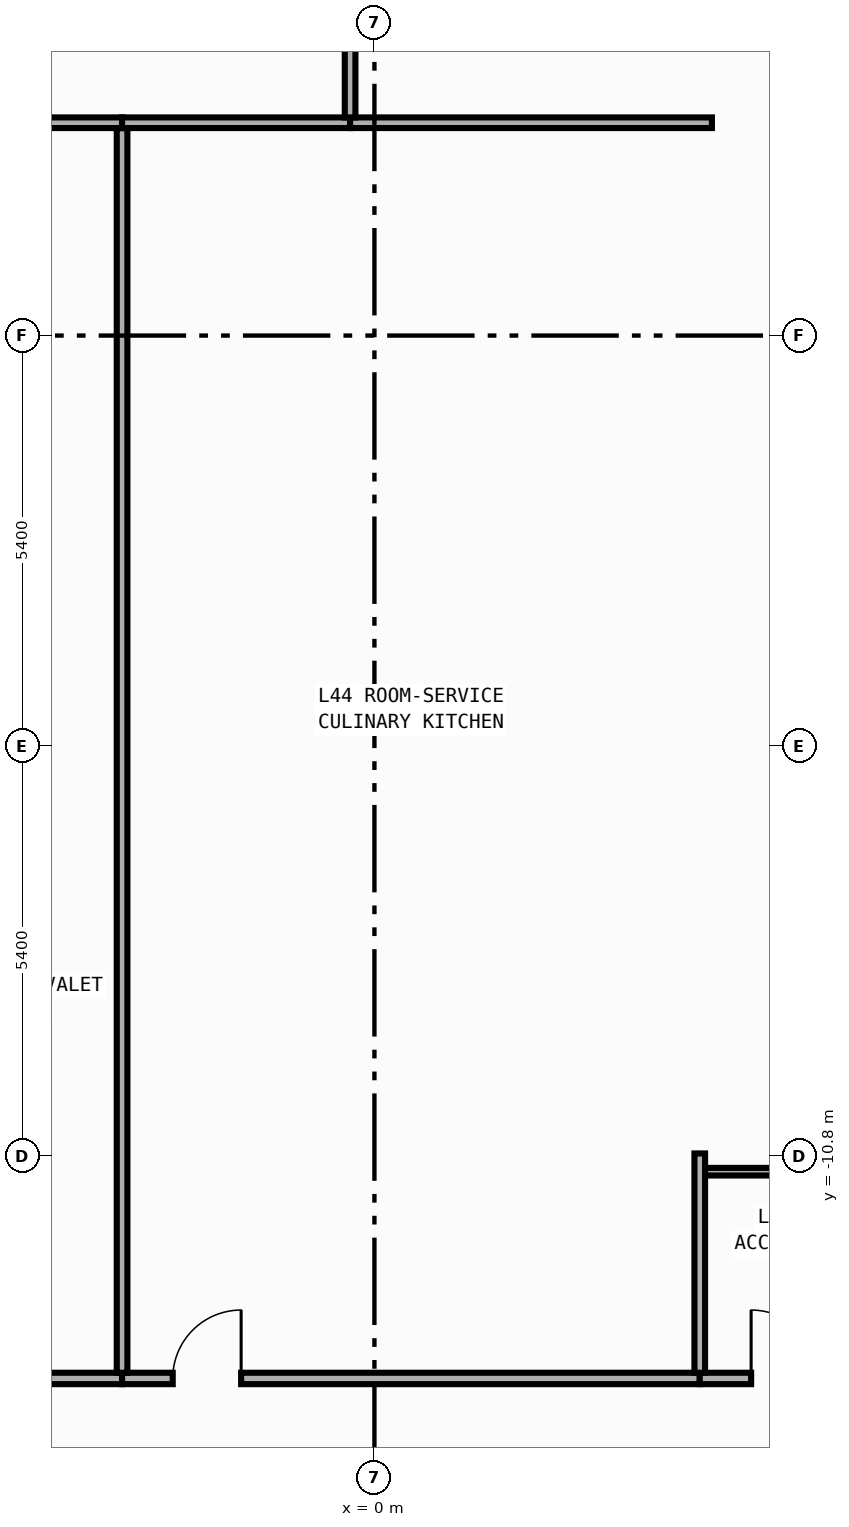
"""IFC4 building model, lengths in metres.
Left out: names, types, materials, properties, quantities, classifications, styles, units other than length and angle.
Written with IfcOpenShell. Run it as: python <this file> out.ifc"""

import sys

from ifc_helpers import new_model, si_unit, direction, frame, frame_2d, origin, place, context, subcontext, project, spatial, rectangle, extrude, element, fill, save


model = new_model("IFC4")
c1 = context("Model", 3, precision=1e-05, world=origin(), true_north=direction((0.0, 1.0)))
c2 = subcontext(c1, "Body", "Model", "MODEL_VIEW")
j1 = project(units=[si_unit("LENGTHUNIT", "METRE"), si_unit("PLANEANGLEUNIT", "RADIAN")], contexts=[c1])
p1 = place(None, origin())
s1 = spatial("IfcSite", under=j1, at=p1, CompositionType="ELEMENT")
p2 = place(p1, origin())
s2 = spatial("IfcBuilding", under=s1, at=p2, CompositionType="ELEMENT")
p3 = place(p2, frame((0.0, 0.0, 191.6)))
s3 = spatial("IfcBuildingStorey", under=s2, at=p3, CompositionType="ELEMENT", Elevation=191.6)
p4 = place(p3, frame((-6.12, -13.72, 0.0), z_axis=(0.0, 0.0, 1.0), x_axis=(1.0, 0.0, 0.0)))
e1 = element("IfcWall", 1, at=p4, inside=s3, PredefinedType="PARTITIONING", context=c2, shape_type="SweptSolid", body=[
    extrude(rectangle(XDim=2.8, YDim=0.15, at=frame_2d((1.4, 0.0))), origin(), (0.0, 0.0, 1.0), 3.54),
])
p5 = place(p4, frame((0.46, 0.0, 0.0)))
e2 = element("IfcOpeningElement", 2, at=p5, cuts=e1, PredefinedType="OPENING", context=c2, shape_type="SweptSolid", body=[
    extrude(rectangle(XDim=0.9, YDim=2.15, at=frame_2d((0.45, 1.075))), frame((0.0, 0.085, 0.0), z_axis=(0.0, -1.0, 0.0), x_axis=(1.0, 0.0, 0.0)), (0.0, 0.0, 1.0), 0.17),
])
p6 = place(p3, frame((-3.32, -13.72, 0.0), z_axis=(0.0, 0.0, 1.0), x_axis=(1.0, 0.0, 0.0)))
e3 = element("IfcWall", 3, at=p6, inside=s3, PredefinedType="PARTITIONING", context=c2, shape_type="SweptSolid", body=[
    extrude(rectangle(XDim=7.6, YDim=0.15, at=frame_2d((3.8, 0.0))), origin(), (0.0, 0.0, 1.0), 3.54),
])
p7 = place(p6, frame((0.667, 0.0, 0.0)))
e4 = element("IfcOpeningElement", 4, at=p7, cuts=e3, PredefinedType="OPENING", context=c2, shape_type="SweptSolid", body=[
    extrude(rectangle(XDim=0.9, YDim=2.15, at=frame_2d((0.45, 1.075))), frame((0.0, 0.085, 0.0), z_axis=(0.0, -1.0, 0.0), x_axis=(1.0, 0.0, 0.0)), (0.0, 0.0, 1.0), 0.17),
])
p8 = place(p3, frame((4.28, -13.72, 0.0), z_axis=(0.0, 0.0, 1.0), x_axis=(1.0, 0.0, 0.0)))
e5 = element("IfcWall", 5, at=p8, inside=s3, PredefinedType="PARTITIONING", context=c2, shape_type="SweptSolid", body=[
    extrude(rectangle(XDim=2.9, YDim=0.15, at=frame_2d((1.45, 0.0))), origin(), (0.0, 0.0, 1.0), 3.54),
])
p9 = place(p8, frame((0.676, 0.0, 0.0)))
e6 = element("IfcOpeningElement", 6, at=p9, cuts=e5, PredefinedType="OPENING", context=c2, shape_type="SweptSolid", body=[
    extrude(rectangle(XDim=0.9, YDim=2.15, at=frame_2d((0.45, 1.075))), frame((0.0, 0.085, 0.0), z_axis=(0.0, -1.0, 0.0), x_axis=(1.0, 0.0, 0.0)), (0.0, 0.0, 1.0), 0.17),
])
p10 = place(p3, frame((-3.32, -13.645, 0.0), z_axis=(0.0, 0.0, 1.0), x_axis=(0.0, 1.0, 0.0)))
e7 = element("IfcWall", 7, at=p10, inside=s3, PredefinedType="PARTITIONING", context=c2, shape_type="SweptSolid", body=[
    extrude(rectangle(XDim=16.375, YDim=0.14, at=frame_2d((8.188, 0.0))), origin(), (0.0, 0.0, 1.0), 3.54),
])
p11 = place(p3, frame((-6.12, 2.8, 0.0), z_axis=(0.0, 0.0, 1.0), x_axis=(1.0, 0.0, 0.0)))
e8 = element("IfcWall", 8, at=p11, inside=s3, PredefinedType="PARTITIONING", context=c2, shape_type="SweptSolid", body=[
    extrude(rectangle(XDim=2.8, YDim=0.14, at=frame_2d((1.4, 0.0))), origin(), (0.0, 0.0, 1.0), 3.54),
])
p12 = place(p3, frame((4.28, -13.645, 0.0), z_axis=(0.0, 0.0, 1.0), x_axis=(0.0, 1.0, 0.0)))
e9 = element("IfcWall", 9, at=p12, inside=s3, PredefinedType="PARTITIONING", context=c2, shape_type="SweptSolid", body=[
    extrude(rectangle(XDim=2.885, YDim=0.14, at=frame_2d((1.442, 0.0))), origin(), (0.0, 0.0, 1.0), 3.54),
])
p13 = place(p3, frame((-3.32, 2.8, 0.0), z_axis=(0.0, 0.0, 1.0), x_axis=(1.0, 0.0, 0.0)))
e10 = element("IfcWall", 10, at=p13, inside=s3, PredefinedType="PARTITIONING", context=c2, shape_type="SweptSolid", body=[
    extrude(rectangle(XDim=3.0, YDim=0.14, at=frame_2d((1.5, 0.0))), origin(), (0.0, 0.0, 1.0), 3.54),
])
p14 = place(p3, frame((-0.32, 2.8, 0.0), z_axis=(0.0, 0.0, 1.0), x_axis=(1.0, 0.0, 0.0)))
e11 = element("IfcWall", 11, at=p14, inside=s3, PredefinedType="PARTITIONING", context=c2, shape_type="SweptSolid", body=[
    extrude(rectangle(XDim=4.76, YDim=0.14, at=frame_2d((2.38, 0.0))), origin(), (0.0, 0.0, 1.0), 3.54),
])
p15 = place(p3, frame((-0.32, 2.87, 0.0), z_axis=(0.0, 0.0, 1.0), x_axis=(0.0, 1.0, 0.0)))
e12 = element("IfcWall", 12, at=p15, inside=s3, PredefinedType="PARTITIONING", context=c2, shape_type="SweptSolid", body=[
    extrude(rectangle(XDim=12.575, YDim=0.14, at=frame_2d((6.288, 0.0))), origin(), (0.0, 0.0, 1.0), 3.54),
])
p16 = place(p3, frame((4.35, -11.0, 0.0), z_axis=(0.0, 0.0, 1.0), x_axis=(1.0, 0.0, 0.0)))
e13 = element("IfcWall", 13, at=p16, inside=s3, PredefinedType="PARTITIONING", context=c2, shape_type="SweptSolid", body=[
    extrude(rectangle(XDim=2.76, YDim=0.1, at=frame_2d((1.38, 0.0))), origin(), (0.0, 0.0, 1.0), 2.952),
])
p17 = place(p7, origin())
e14 = element("IfcDoor", 14, at=p17, inside=s3, OperationType="SINGLE_SWING_RIGHT", PredefinedType="DOOR", context=c2, shape_type="SweptSolid", body=[
    extrude(rectangle(XDim=0.9, YDim=2.15, at=frame_2d((0.45, 1.075))), frame((0.0, 0.025, 0.0), z_axis=(0.0, -1.0, 0.0), x_axis=(1.0, 0.0, 0.0)), (0.0, 0.0, 1.0), 0.05),
])
fill(e4, e14)
p18 = place(p9, origin())
e15 = element("IfcDoor", 15, at=p18, inside=s3, OperationType="SINGLE_SWING_LEFT", PredefinedType="DOOR", context=c2, shape_type="SweptSolid", body=[
    extrude(rectangle(XDim=0.9, YDim=2.15, at=frame_2d((0.45, 1.075))), frame((0.0, 0.025, 0.0), z_axis=(0.0, -1.0, 0.0), x_axis=(1.0, 0.0, 0.0)), (0.0, 0.0, 1.0), 0.05),
])
fill(e6, e15)
save(model, sys.argv[1])
